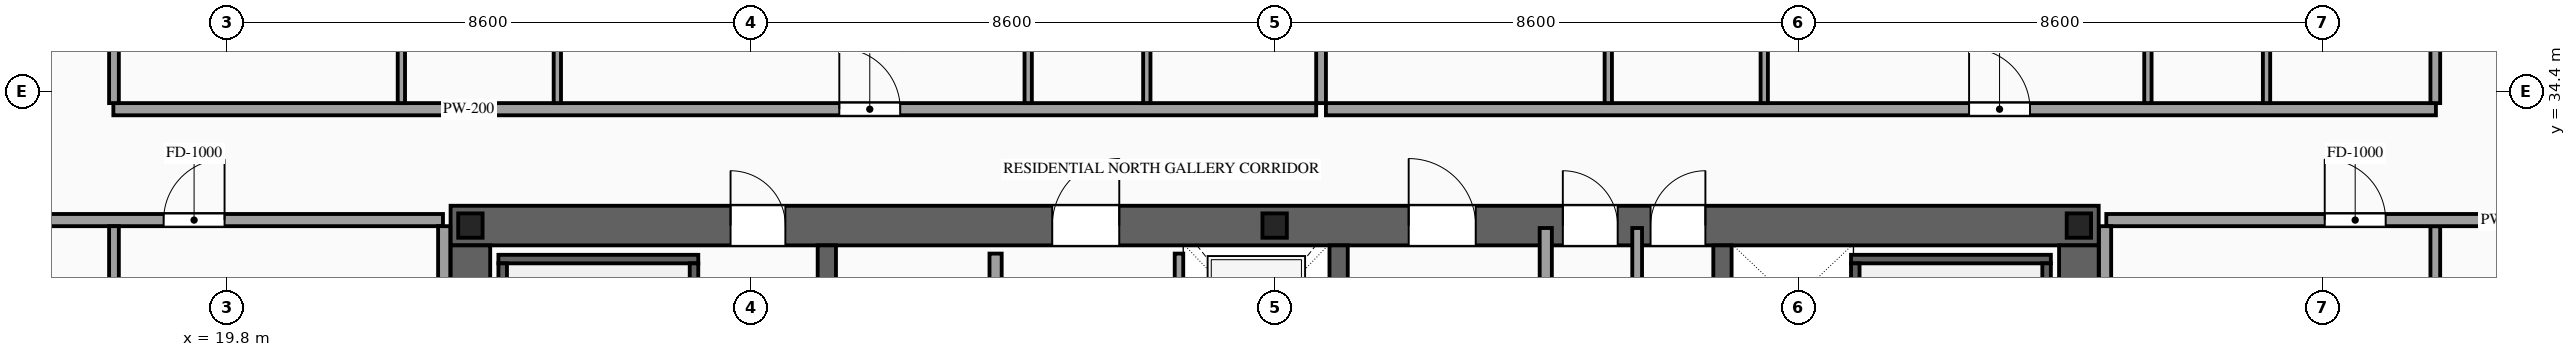
"""IFC4 building model, lengths in metres.
Left out: names, types, materials, properties, quantities, classifications, styles, units other than length and angle.
Written with IfcOpenShell. Run it as: python <this file> out.ifc"""

import sys

from ifc_helpers import new_model, si_unit, direction, frame, frame_2d, origin, origin_2d, place, context, subcontext, project, spatial, rectangle, i_section, extrude, source, transform, mapped, element, fill, save


model = new_model("IFC4")
c1 = context("Model", 3, precision=1e-05, world=origin(), true_north=direction((0.0, 1.0)))
c2 = subcontext(c1, "Body", "Model", "MODEL_VIEW")
j1 = project(units=[si_unit("LENGTHUNIT", "METRE"), si_unit("PLANEANGLEUNIT", "RADIAN")], contexts=[c1])
p1 = place(None, origin())
s1 = spatial("IfcSite", under=j1, at=p1, CompositionType="ELEMENT")
p2 = place(p1, origin())
s2 = spatial("IfcBuilding", under=s1, at=p2, CompositionType="ELEMENT")
p3 = place(p2, frame((0.0, 0.0, 195.0)))
s3 = spatial("IfcBuildingStorey", under=s2, at=p3, CompositionType="ELEMENT", Elevation=195.0)
p4 = place(p3, frame((23.475, 32.2, 0.0), z_axis=(0.0, 0.0, 1.0), x_axis=(1.0, 0.0, 0.0)))
e1 = element("IfcWall", 1, at=p4, inside=s3, PredefinedType="SHEAR", context=c2, shape_type="SweptSolid", body=[
    extrude(rectangle(XDim=27.05, YDim=0.65, at=frame_2d((13.525, 0.0))), origin(), (0.0, 0.0, 1.0), 3.5),
])
p5 = place(p4, frame((4.595, 0.0, 0.0)))
e2 = element("IfcOpeningElement", 2, at=p5, cuts=e1, PredefinedType="OPENING", context=c2, shape_type="SweptSolid", body=[
    extrude(rectangle(XDim=0.9, YDim=2.15, at=frame_2d((0.45, 1.075))), frame((0.0, 0.34, 0.0), z_axis=(0.0, -1.0, 0.0), x_axis=(1.0, 0.0, 0.0)), (0.0, 0.0, 1.0), 0.68),
])
p6 = place(p4, frame((9.875, 0.0, 0.0)))
e3 = element("IfcOpeningElement", 3, at=p6, cuts=e1, PredefinedType="OPENING", context=c2, shape_type="SweptSolid", body=[
    extrude(rectangle(XDim=1.1, YDim=2.2, at=frame_2d((0.55, 1.1))), frame((0.0, 0.34, 0.0), z_axis=(0.0, -1.0, 0.0), x_axis=(1.0, 0.0, 0.0)), (0.0, 0.0, 1.0), 0.68),
])
p7 = place(p4, frame((15.725, 0.0, 0.0)))
e4 = element("IfcOpeningElement", 4, at=p7, cuts=e1, PredefinedType="OPENING", context=c2, shape_type="SweptSolid", body=[
    extrude(rectangle(XDim=1.1, YDim=2.2, at=frame_2d((0.55, 1.1))), frame((0.0, 0.34, 0.0), z_axis=(0.0, -1.0, 0.0), x_axis=(1.0, 0.0, 0.0)), (0.0, 0.0, 1.0), 0.68),
])
p8 = place(p4, frame((18.255, 0.0, 0.0)))
e5 = element("IfcOpeningElement", 5, at=p8, cuts=e1, PredefinedType="OPENING", context=c2, shape_type="SweptSolid", body=[
    extrude(rectangle(XDim=0.9, YDim=2.15, at=frame_2d((0.45, 1.075))), frame((0.0, 0.34, 0.0), z_axis=(0.0, -1.0, 0.0), x_axis=(1.0, 0.0, 0.0)), (0.0, 0.0, 1.0), 0.68),
])
p9 = place(p4, frame((19.695, 0.0, 0.0)))
e6 = element("IfcOpeningElement", 6, at=p9, cuts=e1, PredefinedType="OPENING", context=c2, shape_type="SweptSolid", body=[
    extrude(rectangle(XDim=0.9, YDim=2.15, at=frame_2d((0.45, 1.075))), frame((0.0, 0.34, 0.0), z_axis=(0.0, -1.0, 0.0), x_axis=(1.0, 0.0, 0.0)), (0.0, 0.0, 1.0), 0.68),
])
m1 = source(origin(), c2, "Body", "SweptSolid", [
    extrude(rectangle(XDim=12.15, YDim=0.65, at=frame_2d((6.075, 0.0))), origin(), (0.0, 0.0, 1.0), 3.5),
])
for number, where, z_axis, x_axis in (
    (7, (23.8, 19.725, 0.0), (0.0, 0.0, 1.0), (0.0, 1.0, 0.0)),
    (8, (50.2, 19.725, 0.0), (0.0, 0.0, 1.0), (0.0, 1.0, 0.0)),
):
    element("IfcWall", number, at=place(p3, frame(where, z_axis=z_axis, x_axis=x_axis)), inside=s3, PredefinedType="SHEAR", context=c2, shape_type="MappedRepresentation", body=[
        mapped(m1, transform((0.0, 0.0, 0.0), scale=1.0)),
    ])
m2 = source(origin(), c2, "Body", "SweptSolid", [
    extrude(rectangle(XDim=12.15, YDim=0.3, at=frame_2d((6.075, 0.0))), origin(), (0.0, 0.0, 1.0), 3.5),
])
for number, where, z_axis, x_axis in (
    (9, (29.65, 19.725, 0.0), (0.0, 0.0, 1.0), (0.0, 1.0, 0.0)),
    (10, (38.05, 19.725, 0.0), (0.0, 0.0, 1.0), (0.0, 1.0, 0.0)),
    (11, (44.35, 19.725, 0.0), (0.0, 0.0, 1.0), (0.0, 1.0, 0.0)),
):
    element("IfcWall", number, at=place(p3, frame(where, z_axis=z_axis, x_axis=x_axis)), inside=s3, PredefinedType="SOLIDWALL", context=c2, shape_type="MappedRepresentation", body=[
        mapped(m2, transform((0.0, 0.0, 0.0), scale=1.0)),
    ])
m3 = source(origin(), c2, "Body", "SweptSolid", [
    extrude(i_section(OverallWidth=0.4, OverallDepth=0.4, WebThickness=0.013, FlangeThickness=0.021, at=origin_2d()), origin(), (0.0, 0.0, 1.0), 3.5),
])
for number, where, z_axis, x_axis in (
    (12, (23.8, 32.2, 0.0), (0.0, 0.0, 1.0), (1.0, 0.0, 0.0)),
    (13, (37.0, 32.2, 0.0), (0.0, 0.0, 1.0), (1.0, 0.0, 0.0)),
    (14, (50.2, 32.2, 0.0), (0.0, 0.0, 1.0), (1.0, 0.0, 0.0)),
):
    element("IfcColumn", number, at=place(p3, frame(where, z_axis=z_axis, x_axis=x_axis)), inside=s3, PredefinedType="COLUMN", context=c2, shape_type="MappedRepresentation", body=[
        mapped(m3, transform((0.0, 0.0, 0.0), scale=1.0)),
    ])
p10 = place(p3, frame((35.43, 29.4, 0.0), z_axis=(0.0, 0.0, 1.0), x_axis=(0.0, 1.0, 0.0)))
e15 = element("IfcWall", 15, at=p10, inside=s3, PredefinedType="SOLIDWALL", context=c2, shape_type="SweptSolid", body=[
    extrude(rectangle(XDim=2.34, YDim=0.14, at=frame_2d((1.17, 0.0))), origin(), (0.0, 0.0, 1.0), 3.28),
])
p11 = place(p10, frame((0.62, 0.0, 0.0)))
e16 = element("IfcOpeningElement", 16, at=p11, cuts=e15, PredefinedType="OPENING", context=c2, shape_type="SweptSolid", body=[
    extrude(rectangle(XDim=1.1, YDim=2.2, at=frame_2d((0.55, 1.1))), frame((0.0, 0.085, 0.0), z_axis=(0.0, -1.0, 0.0), x_axis=(1.0, 0.0, 0.0)), (0.0, 0.0, 1.0), 0.17),
])
m4 = source(origin(), c2, "Body", "SweptSolid", [
    extrude(rectangle(XDim=3.28, YDim=0.14, at=frame_2d((1.64, 0.0))), origin(), (0.0, 0.0, 1.0), 3.28),
])
p12 = place(p3, frame((24.26, 31.65, 0.0), z_axis=(0.0, 0.0, 1.0), x_axis=(1.0, 0.0, 0.0)))
e17 = element("IfcWall", 17, at=p12, inside=s3, PredefinedType="SOLIDWALL", context=c2, shape_type="MappedRepresentation", body=[
    mapped(m4, transform((0.0, 0.0, 0.0), scale=1.0)),
])
m5 = source(origin(), c2, "Body", "SweptSolid", [
    extrude(rectangle(XDim=8.94, YDim=0.14, at=frame_2d((4.47, 0.0))), origin(), (0.0, 0.0, 1.0), 3.28),
])
for number, where, z_axis, x_axis in (
    (18, (24.33, 22.64, 0.0), (0.0, 0.0, 1.0), (0.0, 1.0, 0.0)),
    (19, (27.47, 22.64, 0.0), (0.0, 0.0, 1.0), (0.0, 1.0, 0.0)),
):
    element("IfcWall", number, at=place(p3, frame(where, z_axis=z_axis, x_axis=x_axis)), inside=s3, PredefinedType="SOLIDWALL", context=c2, shape_type="MappedRepresentation", body=[
        mapped(m5, transform((0.0, 0.0, 0.0), scale=1.0)),
    ])
p13 = place(p3, frame((46.46, 31.65, 0.0), z_axis=(0.0, 0.0, 1.0), x_axis=(1.0, 0.0, 0.0)))
e20 = element("IfcWall", 20, at=p13, inside=s3, PredefinedType="SOLIDWALL", context=c2, shape_type="MappedRepresentation", body=[
    mapped(m4, transform((0.0, 0.0, 0.0), scale=1.0)),
])
for number, where, z_axis, x_axis in (
    (21, (46.53, 22.64, 0.0), (0.0, 0.0, 1.0), (0.0, 1.0, 0.0)),
    (22, (49.67, 22.64, 0.0), (0.0, 0.0, 1.0), (0.0, 1.0, 0.0)),
):
    element("IfcWall", number, at=place(p3, frame(where, z_axis=z_axis, x_axis=x_axis)), inside=s3, PredefinedType="SOLIDWALL", context=c2, shape_type="MappedRepresentation", body=[
        mapped(m5, transform((0.0, 0.0, 0.0), scale=1.0)),
    ])
p14 = place(p3, frame((32.42, 28.05, 0.0), z_axis=(0.0, 0.0, 1.0), x_axis=(0.0, 1.0, 0.0)))
e23 = element("IfcWall", 23, at=p14, inside=s3, PredefinedType="PARTITIONING", context=c2, shape_type="SweptSolid", body=[
    extrude(rectangle(XDim=3.69, YDim=0.2, at=frame_2d((1.845, 0.0))), origin(), (0.0, 0.0, 1.0), 3.28),
])
p15 = place(p14, frame((1.395, 0.0, 0.0)))
e24 = element("IfcOpeningElement", 24, at=p15, cuts=e23, PredefinedType="OPENING", context=c2, shape_type="SweptSolid", body=[
    extrude(rectangle(XDim=0.9, YDim=2.15, at=frame_2d((0.45, 1.075))), frame((0.0, 0.115, 0.0), z_axis=(0.0, -1.0, 0.0), x_axis=(1.0, 0.0, 0.0)), (0.0, 0.0, 1.0), 0.23),
])
m6 = source(origin(), c2, "Body", "SweptSolid", [
    extrude(rectangle(XDim=5.96, YDim=0.2, at=frame_2d((2.98, 0.0))), origin(), (0.0, 0.0, 1.0), 3.28),
])
p16 = place(p3, frame((41.45, 26.2, 0.0), z_axis=(0.0, 0.0, 1.0), x_axis=(0.0, 1.0, 0.0)))
e25 = element("IfcWall", 25, at=p16, inside=s3, PredefinedType="PARTITIONING", context=c2, shape_type="MappedRepresentation", body=[
    mapped(m6, transform((0.0, 0.0, 0.0), scale=1.0)),
])
m7 = source(origin(), c2, "Body", "SweptSolid", [
    extrude(rectangle(XDim=5.96, YDim=0.16, at=frame_2d((2.98, 0.0))), origin(), (0.0, 0.0, 1.0), 3.28),
])
p17 = place(p3, frame((42.95, 26.2, 0.0), z_axis=(0.0, 0.0, 1.0), x_axis=(0.0, 1.0, 0.0)))
e26 = element("IfcWall", 26, at=p17, inside=s3, PredefinedType="PARTITIONING", context=c2, shape_type="MappedRepresentation", body=[
    mapped(m7, transform((0.0, 0.0, 0.0), scale=1.0)),
])
p18 = place(p3, frame((17.94, 34.11, 0.0), z_axis=(0.0, 0.0, 1.0), x_axis=(1.0, 0.0, 0.0)))
e27 = element("IfcWall", 27, at=p18, inside=s3, PredefinedType="PARTITIONING", context=c2, shape_type="SweptSolid", body=[
    extrude(rectangle(XDim=19.742, YDim=0.2, at=frame_2d((9.871, 0.0))), origin(), (0.0, 0.0, 1.0), 3.28),
])
p19 = place(p18, frame((11.915, 0.0, 0.0)))
e28 = element("IfcOpeningElement", 28, at=p19, cuts=e27, PredefinedType="OPENING", context=c2, shape_type="SweptSolid", body=[
    extrude(rectangle(XDim=1.0, YDim=2.2, at=frame_2d((0.5, 1.1))), frame((0.0, 0.115, 0.0), z_axis=(0.0, -1.0, 0.0), x_axis=(1.0, 0.0, 0.0)), (0.0, 0.0, 1.0), 0.23),
])
m8 = source(origin(), c2, "Body", "SweptSolid", [
    extrude(rectangle(XDim=13.54, YDim=0.16, at=frame_2d((6.77, 0.0))), origin(), (0.0, 0.0, 1.0), 3.28),
])
p20 = place(p3, frame((37.762, 34.21, 0.0), z_axis=(0.0, 0.0, 1.0), x_axis=(0.0, 1.0, 0.0)))
e29 = element("IfcWall", 29, at=p20, inside=s3, PredefinedType="PARTITIONING", context=c2, shape_type="MappedRepresentation", body=[
    mapped(m8, transform((0.0, 0.0, 0.0), scale=1.0)),
])
m9 = source(origin(), c2, "Body", "SweptSolid", [
    extrude(rectangle(XDim=5.61, YDim=0.12, at=frame_2d((2.805, 0.0))), origin(), (0.0, 0.0, 1.0), 3.28),
])
p21 = place(p3, frame((22.667, 34.21, 0.0), z_axis=(0.0, 0.0, 1.0), x_axis=(0.0, 1.0, 0.0)))
e30 = element("IfcWall", 30, at=p21, inside=s3, PredefinedType="PARTITIONING", context=c2, shape_type="MappedRepresentation", body=[
    mapped(m9, transform((0.0, 0.0, 0.0), scale=1.0)),
])
p22 = place(p3, frame((25.227, 34.21, 0.0), z_axis=(0.0, 0.0, 1.0), x_axis=(0.0, 1.0, 0.0)))
e31 = element("IfcWall", 31, at=p22, inside=s3, PredefinedType="PARTITIONING", context=c2, shape_type="SweptSolid", body=[
    extrude(rectangle(XDim=5.61, YDim=0.12, at=frame_2d((2.805, 0.0))), origin(), (0.0, 0.0, 1.0), 3.28),
])
p23 = place(p22, frame((2.38, 0.0, 0.0)))
e32 = element("IfcOpeningElement", 32, at=p23, cuts=e31, PredefinedType="OPENING", context=c2, shape_type="SweptSolid", body=[
    extrude(rectangle(XDim=0.85, YDim=2.1, at=frame_2d((0.425, 1.05))), frame((0.0, 0.075, 0.0), z_axis=(0.0, -1.0, 0.0), x_axis=(1.0, 0.0, 0.0)), (0.0, 0.0, 1.0), 0.15),
])
for number, where, z_axis, x_axis in (
    (33, (34.902, 34.21, 0.0), (0.0, 0.0, 1.0), (0.0, 1.0, 0.0)),
    (34, (32.955, 34.21, 0.0), (0.0, 0.0, 1.0), (0.0, 1.0, 0.0)),
):
    element("IfcWall", number, at=place(p3, frame(where, z_axis=z_axis, x_axis=x_axis)), inside=s3, PredefinedType="PARTITIONING", context=c2, shape_type="MappedRepresentation", body=[
        mapped(m9, transform((0.0, 0.0, 0.0), scale=1.0)),
    ])
p24 = place(p3, frame((37.842, 34.11, 0.0), z_axis=(0.0, 0.0, 1.0), x_axis=(1.0, 0.0, 0.0)))
e35 = element("IfcWall", 35, at=p24, inside=s3, PredefinedType="PARTITIONING", context=c2, shape_type="SweptSolid", body=[
    extrude(rectangle(XDim=18.218, YDim=0.2, at=frame_2d((9.109, 0.0))), origin(), (0.0, 0.0, 1.0), 3.28),
])
p25 = place(p24, frame((10.556, 0.0, 0.0)))
e36 = element("IfcOpeningElement", 36, at=p25, cuts=e35, PredefinedType="OPENING", context=c2, shape_type="SweptSolid", body=[
    extrude(rectangle(XDim=1.0, YDim=2.2, at=frame_2d((0.5, 1.1))), frame((0.0, 0.115, 0.0), z_axis=(0.0, -1.0, 0.0), x_axis=(1.0, 0.0, 0.0)), (0.0, 0.0, 1.0), 0.23),
])
m10 = source(origin(), c2, "Body", "SweptSolid", [
    extrude(rectangle(XDim=13.39, YDim=0.16, at=frame_2d((6.695, 0.0))), origin(), (0.0, 0.0, 1.0), 3.28),
])
for number, where, z_axis, x_axis in (
    (37, (17.95, 34.21, 0.0), (0.0, 0.0, 1.0), (0.0, 1.0, 0.0)),
    (38, (56.05, 34.21, 0.0), (0.0, 0.0, 1.0), (0.0, 1.0, 0.0)),
):
    element("IfcWall", number, at=place(p3, frame(where, z_axis=z_axis, x_axis=x_axis)), inside=s3, PredefinedType="PARTITIONING", context=c2, shape_type="MappedRepresentation", body=[
        mapped(m10, transform((0.0, 0.0, 0.0), scale=1.0)),
    ])
p26 = place(p3, frame((42.476, 34.21, 0.0), z_axis=(0.0, 0.0, 1.0), x_axis=(0.0, 1.0, 0.0)))
e39 = element("IfcWall", 39, at=p26, inside=s3, PredefinedType="PARTITIONING", context=c2, shape_type="MappedRepresentation", body=[
    mapped(m9, transform((0.0, 0.0, 0.0), scale=1.0)),
])
p27 = place(p3, frame((45.036, 34.21, 0.0), z_axis=(0.0, 0.0, 1.0), x_axis=(0.0, 1.0, 0.0)))
e40 = element("IfcWall", 40, at=p27, inside=s3, PredefinedType="PARTITIONING", context=c2, shape_type="SweptSolid", body=[
    extrude(rectangle(XDim=5.61, YDim=0.12, at=frame_2d((2.805, 0.0))), origin(), (0.0, 0.0, 1.0), 3.28),
])
p28 = place(p27, frame((2.38, 0.0, 0.0)))
e41 = element("IfcOpeningElement", 41, at=p28, cuts=e40, PredefinedType="OPENING", context=c2, shape_type="SweptSolid", body=[
    extrude(rectangle(XDim=0.85, YDim=2.1, at=frame_2d((0.425, 1.05))), frame((0.0, 0.075, 0.0), z_axis=(0.0, -1.0, 0.0), x_axis=(1.0, 0.0, 0.0)), (0.0, 0.0, 1.0), 0.15),
])
for number, where, z_axis, x_axis in (
    (42, (53.28, 34.21, 0.0), (0.0, 0.0, 1.0), (0.0, 1.0, 0.0)),
    (43, (51.333, 34.21, 0.0), (0.0, 0.0, 1.0), (0.0, 1.0, 0.0)),
):
    element("IfcWall", number, at=place(p3, frame(where, z_axis=z_axis, x_axis=x_axis)), inside=s3, PredefinedType="PARTITIONING", context=c2, shape_type="MappedRepresentation", body=[
        mapped(m9, transform((0.0, 0.0, 0.0), scale=1.0)),
    ])
p29 = place(p3, frame((15.05, 32.29, 0.0), z_axis=(0.0, 0.0, 1.0), x_axis=(1.0, 0.0, 0.0)))
e44 = element("IfcWall", 44, at=p29, inside=s3, PredefinedType="PARTITIONING", context=c2, shape_type="SweptSolid", body=[
    extrude(rectangle(XDim=8.3, YDim=0.2, at=frame_2d((4.15, 0.0))), origin(), (0.0, 0.0, 1.0), 2.775),
])
p30 = place(p29, frame((3.715, 0.0, 0.0)))
e45 = element("IfcOpeningElement", 45, at=p30, cuts=e44, PredefinedType="OPENING", context=c2, shape_type="SweptSolid", body=[
    extrude(rectangle(XDim=1.0, YDim=2.2, at=frame_2d((0.5, 1.1))), frame((0.0, 0.115, 0.0), z_axis=(0.0, -1.0, 0.0), x_axis=(1.0, 0.0, 0.0)), (0.0, 0.0, 1.0), 0.23),
])
m11 = source(origin(), c2, "Body", "SweptSolid", [
    extrude(rectangle(XDim=28.19, YDim=0.16, at=frame_2d((14.095, 0.0))), origin(), (0.0, 0.0, 1.0), 3.28),
])
for number, where, z_axis, x_axis in (
    (46, (17.95, 4.0, 0.0), (0.0, 0.0, 1.0), (0.0, 1.0, 0.0)),
    (47, (56.05, 4.0, 0.0), (0.0, 0.0, 1.0), (0.0, 1.0, 0.0)),
):
    element("IfcWall", number, at=place(p3, frame(where, z_axis=z_axis, x_axis=x_axis)), inside=s3, PredefinedType="PARTITIONING", context=c2, shape_type="MappedRepresentation", body=[
        mapped(m11, transform((0.0, 0.0, 0.0), scale=1.0)),
    ])
m12 = source(origin(), c2, "Body", "SweptSolid", [
    extrude(rectangle(XDim=6.29, YDim=0.2, at=frame_2d((3.145, 0.0))), origin(), (0.0, 0.0, 1.0), 3.28),
])
p31 = place(p3, frame((23.37, 25.9, 0.0), z_axis=(0.0, 0.0, 1.0), x_axis=(0.0, 1.0, 0.0)))
e48 = element("IfcWall", 48, at=p31, inside=s3, PredefinedType="PARTITIONING", context=c2, shape_type="MappedRepresentation", body=[
    mapped(m12, transform((0.0, 0.0, 0.0), scale=1.0)),
])
p32 = place(p3, frame((50.65, 32.29, 0.0), z_axis=(0.0, 0.0, 1.0), x_axis=(1.0, 0.0, 0.0)))
e49 = element("IfcWall", 49, at=p32, inside=s3, PredefinedType="PARTITIONING", context=c2, shape_type="SweptSolid", body=[
    extrude(rectangle(XDim=8.3, YDim=0.2, at=frame_2d((4.15, 0.0))), origin(), (0.0, 0.0, 1.0), 2.775),
])
p33 = place(p32, frame((3.585, 0.0, 0.0)))
e50 = element("IfcOpeningElement", 50, at=p33, cuts=e49, PredefinedType="OPENING", context=c2, shape_type="SweptSolid", body=[
    extrude(rectangle(XDim=1.0, YDim=2.2, at=frame_2d((0.5, 1.1))), frame((0.0, 0.115, 0.0), z_axis=(0.0, -1.0, 0.0), x_axis=(1.0, 0.0, 0.0)), (0.0, 0.0, 1.0), 0.23),
])
m13 = source(origin(), c2, "Body", "SweptSolid", [
    extrude(rectangle(XDim=12.78, YDim=0.2, at=frame_2d((6.39, 0.0))), origin(), (0.0, 0.0, 1.0), 3.28),
])
p34 = place(p3, frame((50.63, 19.41, 0.0), z_axis=(0.0, 0.0, 1.0), x_axis=(0.0, 1.0, 0.0)))
e51 = element("IfcWall", 51, at=p34, inside=s3, PredefinedType="PARTITIONING", context=c2, shape_type="MappedRepresentation", body=[
    mapped(m13, transform((0.0, 0.0, 0.0), scale=1.0)),
])
m14 = source(origin(), c2, "Body", "SweptSolid", [
    extrude(rectangle(XDim=0.9, YDim=2.15, at=frame_2d((0.45, 1.075))), frame((0.0, 0.025, 0.0), z_axis=(0.0, -1.0, 0.0), x_axis=(1.0, 0.0, 0.0)), (0.0, 0.0, 1.0), 0.05),
])
p35 = place(p5, origin())
e52 = element("IfcDoor", 52, at=p35, inside=s3, OperationType="SINGLE_SWING_LEFT", PredefinedType="DOOR", context=c2, shape_type="MappedRepresentation", body=[
    mapped(m14, transform((0.0, 0.0, 0.0), scale=1.0)),
])
fill(e2, e52)
m15 = source(origin(), c2, "Body", "SweptSolid", [
    extrude(rectangle(XDim=1.1, YDim=2.2, at=frame_2d((0.55, 1.1))), frame((0.0, 0.025, 0.0), z_axis=(0.0, -1.0, 0.0), x_axis=(1.0, 0.0, 0.0)), (0.0, 0.0, 1.0), 0.05),
])
p36 = place(p6, origin())
e53 = element("IfcDoor", 53, at=p36, inside=s3, OperationType="SINGLE_SWING_RIGHT", PredefinedType="DOOR", context=c2, shape_type="MappedRepresentation", body=[
    mapped(m15, transform((0.0, 0.0, 0.0), scale=1.0)),
])
fill(e3, e53)
p37 = place(p7, origin())
e54 = element("IfcDoor", 54, at=p37, inside=s3, OperationType="SINGLE_SWING_LEFT", PredefinedType="DOOR", context=c2, shape_type="MappedRepresentation", body=[
    mapped(m15, transform((0.0, 0.0, 0.0), scale=1.0)),
])
fill(e4, e54)
p38 = place(p8, origin())
e55 = element("IfcDoor", 55, at=p38, inside=s3, OperationType="SINGLE_SWING_LEFT", PredefinedType="DOOR", context=c2, shape_type="MappedRepresentation", body=[
    mapped(m14, transform((0.0, 0.0, 0.0), scale=1.0)),
])
fill(e5, e55)
p39 = place(p9, origin())
e56 = element("IfcDoor", 56, at=p39, inside=s3, OperationType="SINGLE_SWING_RIGHT", PredefinedType="DOOR", context=c2, shape_type="MappedRepresentation", body=[
    mapped(m14, transform((0.0, 0.0, 0.0), scale=1.0)),
])
fill(e6, e56)
m16 = source(origin(), c2, "Body", "SweptSolid", [
    extrude(rectangle(XDim=1.0, YDim=2.2, at=frame_2d((0.5, 1.1))), frame((0.0, 0.025, 0.0), z_axis=(0.0, -1.0, 0.0), x_axis=(1.0, 0.0, 0.0)), (0.0, 0.0, 1.0), 0.05),
])
p40 = place(p19, origin())
e57 = element("IfcDoor", 57, at=p40, inside=s3, OperationType="SINGLE_SWING_LEFT", PredefinedType="DOOR", context=c2, shape_type="MappedRepresentation", body=[
    mapped(m16, transform((0.0, 0.0, 0.0), scale=1.0)),
])
fill(e28, e57)
p41 = place(p25, origin())
e58 = element("IfcDoor", 58, at=p41, inside=s3, OperationType="SINGLE_SWING_LEFT", PredefinedType="DOOR", context=c2, shape_type="MappedRepresentation", body=[
    mapped(m16, transform((0.0, 0.0, 0.0), scale=1.0)),
])
fill(e36, e58)
p42 = place(p30, origin())
e59 = element("IfcDoor", 59, at=p42, inside=s3, OperationType="SINGLE_SWING_RIGHT", PredefinedType="DOOR", context=c2, shape_type="MappedRepresentation", body=[
    mapped(m16, transform((0.0, 0.0, 0.0), scale=1.0)),
])
fill(e45, e59)
p43 = place(p33, origin())
e60 = element("IfcDoor", 60, at=p43, inside=s3, OperationType="SINGLE_SWING_LEFT", PredefinedType="DOOR", context=c2, shape_type="MappedRepresentation", body=[
    mapped(m16, transform((0.0, 0.0, 0.0), scale=1.0)),
])
fill(e50, e60)
save(model, sys.argv[1])
